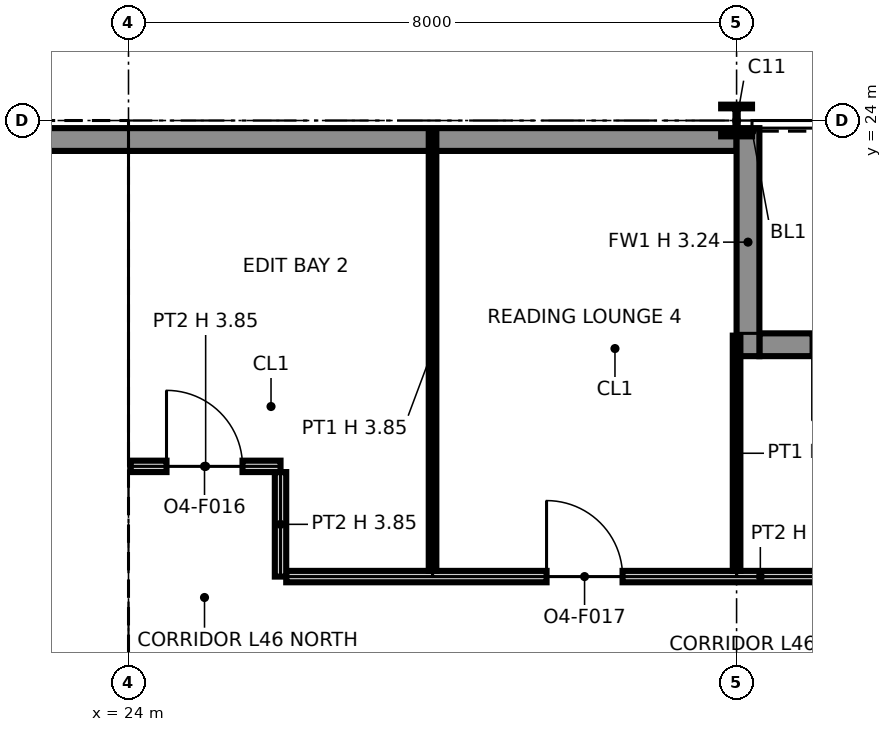
"""IFC4 building model, lengths in metres.
Left out: names, types, materials, properties, quantities, classifications, styles, units other than length and angle.
Written with IfcOpenShell. Run it as: python <this file> out.ifc"""

import sys

from ifc_helpers import new_model, si_unit, direction, frame, frame_2d, origin, origin_2d, place, context, subcontext, project, spatial, polyline, rectangle, i_section, outline, extrude, element, fill, save


model = new_model("IFC4")
c1 = context("Model", 3, precision=1e-05, world=origin(), true_north=direction((0.0, 1.0)))
c2 = subcontext(c1, "Body", "Model", "MODEL_VIEW")
j1 = project(units=[si_unit("LENGTHUNIT", "METRE"), si_unit("PLANEANGLEUNIT", "RADIAN")], contexts=[c1])
p1 = place(None, origin())
s1 = spatial("IfcSite", under=j1, at=p1, CompositionType="ELEMENT")
p2 = place(p1, origin())
s2 = spatial("IfcBuilding", under=s1, at=p2, CompositionType="ELEMENT")
p3 = place(p2, frame((0.0, 0.0, 217.0)))
s3 = spatial("IfcBuildingStorey", under=s2, at=p3, CompositionType="ELEMENT", Elevation=217.0)
for number, where, z_axis, x_axis in (
    (1, (24.0, 24.0, 0.0), (0.0, 0.0, 1.0), (1.0, 0.0, 0.0)),
    (2, (32.0, 24.0, 0.0), (0.0, 0.0, 1.0), (1.0, 0.0, 0.0)),
):
    element("IfcColumn", number, at=place(p3, frame(where, z_axis=z_axis, x_axis=x_axis)), inside=s3, PredefinedType="COLUMN", context=c2, shape_type="SweptSolid", body=[
        extrude(i_section(OverallWidth=0.406, OverallDepth=0.417, WebThickness=0.03, FlangeThickness=0.048, at=origin_2d()), origin(), (0.0, 0.0, 1.0), 3.85),
    ])
p4 = place(p3, frame((39.7, 21.05, 0.0), z_axis=(0.0, 0.0, 1.0), x_axis=(-1.0, 0.0, 0.0)))
e3 = element("IfcWall", 3, at=p4, inside=s3, PredefinedType="SOLIDWALL", context=c2, shape_type="SweptSolid", body=[
    extrude(rectangle(XDim=7.4, YDim=0.3, at=frame_2d((3.7, 0.0))), origin(), (0.0, 0.0, 1.0), 3.85),
])
p5 = place(p4, frame((0.3, 0.0, 0.9)))
e4 = element("IfcOpeningElement", 4, at=p5, cuts=e3, PredefinedType="OPENING", context=c2, shape_type="SweptSolid", body=[
    extrude(rectangle(XDim=2.8, YDim=2.2, at=frame_2d((1.4, 1.1))), frame((0.0, 0.16, 0.0), z_axis=(0.0, -1.0, 0.0), x_axis=(1.0, 0.0, 0.0)), (0.0, 0.0, 1.0), 0.32),
])
p6 = place(p4, frame((4.7, 0.0, 0.0)))
e5 = element("IfcOpeningElement", 5, at=p6, cuts=e3, PredefinedType="OPENING", context=c2, shape_type="SweptSolid", body=[
    extrude(rectangle(XDim=2.0, YDim=2.4, at=frame_2d((1.0, 1.2))), frame((0.0, 0.16, 0.0), z_axis=(0.0, -1.0, 0.0), x_axis=(1.0, 0.0, 0.0)), (0.0, 0.0, 1.0), 0.32),
])
p7 = place(p3, frame((32.15, 23.9, 0.0), z_axis=(0.0, 0.0, 1.0), x_axis=(0.0, -1.0, 0.0)))
e6 = element("IfcWall", 6, at=p7, inside=s3, PredefinedType="SOLIDWALL", context=c2, shape_type="SweptSolid", body=[
    extrude(rectangle(XDim=3.0, YDim=0.3, at=frame_2d((1.5, 0.0))), origin(), (0.0, 0.0, 1.0), 3.237),
])
p8 = place(p3, frame((32.0, 23.75, 0.0), z_axis=(0.0, 0.0, 1.0), x_axis=(-1.0, 0.0, 0.0)))
e7 = element("IfcWall", 7, at=p8, inside=s3, PredefinedType="SOLIDWALL", context=c2, shape_type="SweptSolid", body=[
    extrude(rectangle(XDim=25.9, YDim=0.3, at=frame_2d((12.95, 0.0))), origin(), (0.0, 0.0, 1.0), 3.85),
])
p9 = place(p3, frame((8.65, 23.25, 0.0), z_axis=(0.0, 0.0, 1.0), x_axis=(1.0, 0.0, 0.0)))
e8 = element("IfcWall", 8, at=p9, inside=s3, PredefinedType="PARTITIONING", context=c2, shape_type="SweptSolid", body=[
    extrude(outline(polyline([(0.0, 0.0), (14.7, 0.0), (14.7, 3.85), (7.438, 3.85), (7.438, 3.308), (7.262, 3.308), (7.261, 3.85), (0.0, 3.85), (0.0, 0.0)])), frame((0.0, 0.1, 0.0), z_axis=(0.0, -1.0, 0.0), x_axis=(1.0, 0.0, 0.0)), (0.0, 0.0, 1.0), 0.2),
])
p10 = place(p3, frame((8.85, 19.9, 0.0), z_axis=(0.0, 0.0, 1.0), x_axis=(1.0, 0.0, 0.0)))
e9 = element("IfcWall", 9, at=p10, inside=s3, PredefinedType="PARTITIONING", context=c2, shape_type="SweptSolid", body=[
    extrude(outline(polyline([(0.0, 0.0), (14.3, 0.0), (14.3, 3.85), (7.239, 3.85), (7.238, 3.308), (7.062, 3.308), (7.062, 3.85), (0.0, 3.85), (0.0, 0.0)])), frame((0.0, 0.1, 0.0), z_axis=(0.0, -1.0, 0.0), x_axis=(1.0, 0.0, 0.0)), (0.0, 0.0, 1.0), 0.2),
])
p11 = place(p10, frame((2.125, 0.0, 0.0)))
e10 = element("IfcOpeningElement", 10, at=p11, cuts=e9, PredefinedType="OPENING", context=c2, shape_type="SweptSolid", body=[
    extrude(rectangle(XDim=0.9, YDim=2.1, at=frame_2d((0.45, 1.05))), frame((0.0, 0.11, 0.0), z_axis=(0.0, -1.0, 0.0), x_axis=(1.0, 0.0, 0.0)), (0.0, 0.0, 1.0), 0.22),
])
p12 = place(p10, frame((5.65, 0.0, 0.0)))
e11 = element("IfcOpeningElement", 11, at=p12, cuts=e9, PredefinedType="OPENING", context=c2, shape_type="SweptSolid", body=[
    extrude(rectangle(XDim=1.1, YDim=2.1, at=frame_2d((0.55, 1.05))), frame((0.0, 0.11, 0.0), z_axis=(0.0, -1.0, 0.0), x_axis=(1.0, 0.0, 0.0)), (0.0, 0.0, 1.0), 0.22),
])
p13 = place(p10, frame((7.95, 0.0, 0.0)))
e12 = element("IfcOpeningElement", 12, at=p13, cuts=e9, PredefinedType="OPENING", context=c2, shape_type="SweptSolid", body=[
    extrude(rectangle(XDim=1.1, YDim=2.1, at=frame_2d((0.55, 1.05))), frame((0.0, 0.11, 0.0), z_axis=(0.0, -1.0, 0.0), x_axis=(1.0, 0.0, 0.0)), (0.0, 0.0, 1.0), 0.22),
])
p14 = place(p10, frame((10.25, 0.0, 0.0)))
e13 = element("IfcOpeningElement", 13, at=p14, cuts=e9, PredefinedType="OPENING", context=c2, shape_type="SweptSolid", body=[
    extrude(rectangle(XDim=1.1, YDim=2.1, at=frame_2d((0.55, 1.05))), frame((0.0, 0.11, 0.0), z_axis=(0.0, -1.0, 0.0), x_axis=(1.0, 0.0, 0.0)), (0.0, 0.0, 1.0), 0.22),
])
p15 = place(p10, frame((12.625, 0.0, 0.0)))
e14 = element("IfcOpeningElement", 14, at=p15, cuts=e9, PredefinedType="OPENING", context=c2, shape_type="SweptSolid", body=[
    extrude(rectangle(XDim=1.1, YDim=2.1, at=frame_2d((0.55, 1.05))), frame((0.0, 0.11, 0.0), z_axis=(0.0, -1.0, 0.0), x_axis=(1.0, 0.0, 0.0)), (0.0, 0.0, 1.0), 0.22),
])
p16 = place(p3, frame((23.25, 8.85, 0.0), z_axis=(0.0, 0.0, 1.0), x_axis=(0.0, 1.0, 0.0)))
e15 = element("IfcWall", 15, at=p16, inside=s3, PredefinedType="PARTITIONING", context=c2, shape_type="SweptSolid", body=[
    extrude(outline(polyline([(0.0, 0.0), (14.3, 0.0), (14.3, 3.85), (10.225, 3.85), (10.224, 3.44), (10.076, 3.44), (10.075, 3.85), (7.239, 3.85), (7.238, 3.308), (7.062, 3.308), (7.062, 3.85), (5.225, 3.85), (5.224, 3.44), (5.076, 3.44), (5.075, 3.85), (0.0, 3.85), (0.0, 0.0)])), frame((0.0, 0.1, 0.0), z_axis=(0.0, -1.0, 0.0), x_axis=(1.0, 0.0, 0.0)), (0.0, 0.0, 1.0), 0.2),
])
p17 = place(p16, frame((8.3, 0.0, 0.0)))
e16 = element("IfcOpeningElement", 16, at=p17, cuts=e15, PredefinedType="OPENING", context=c2, shape_type="SweptSolid", body=[
    extrude(rectangle(XDim=1.8, YDim=2.1, at=frame_2d((0.9, 1.05))), frame((0.0, 0.11, 0.0), z_axis=(0.0, -1.0, 0.0), x_axis=(1.0, 0.0, 0.0)), (0.0, 0.0, 1.0), 0.22),
])
p18 = place(p3, frame((26.075, 18.0, 0.0), z_axis=(0.0, 0.0, 1.0), x_axis=(1.0, 0.0, 0.0)))
e17 = element("IfcWall", 17, at=p18, inside=s3, PredefinedType="PARTITIONING", context=c2, shape_type="SweptSolid", body=[
    extrude(rectangle(XDim=12.475, YDim=0.15, at=frame_2d((6.238, 0.0))), origin(), (0.0, 0.0, 1.0), 3.85),
])
p19 = place(p18, frame((8.7, 0.0, 0.0)))
e18 = element("IfcOpeningElement", 18, at=p19, cuts=e17, PredefinedType="OPENING", context=c2, shape_type="SweptSolid", body=[
    extrude(rectangle(XDim=1.0, YDim=2.1, at=frame_2d((0.5, 1.05))), frame((0.0, 0.085, 0.0), z_axis=(0.0, -1.0, 0.0), x_axis=(1.0, 0.0, 0.0)), (0.0, 0.0, 1.0), 0.17),
])
p20 = place(p18, frame((3.425, 0.0, 0.0)))
e19 = element("IfcOpeningElement", 19, at=p20, cuts=e17, PredefinedType="OPENING", context=c2, shape_type="SweptSolid", body=[
    extrude(rectangle(XDim=1.0, YDim=2.1, at=frame_2d((0.5, 1.05))), frame((0.0, 0.085, 0.0), z_axis=(0.0, -1.0, 0.0), x_axis=(1.0, 0.0, 0.0)), (0.0, 0.0, 1.0), 0.17),
])
p21 = place(p3, frame((26.0, 18.0, 0.0), z_axis=(0.0, 0.0, 1.0), x_axis=(0.0, 1.0, 0.0)))
e20 = element("IfcWall", 20, at=p21, inside=s3, PredefinedType="PARTITIONING", context=c2, shape_type="SweptSolid", body=[
    extrude(rectangle(XDim=1.375, YDim=0.15, at=frame_2d((0.688, 0.0))), origin(), (0.0, 0.0, 1.0), 3.85),
])
p22 = place(p3, frame((28.0, 18.075, 0.0), z_axis=(0.0, 0.0, 1.0), x_axis=(0.0, 1.0, 0.0)))
e21 = element("IfcWall", 21, at=p22, inside=s3, PredefinedType="PARTITIONING", context=c2, shape_type="SweptSolid", body=[
    extrude(outline(polyline([(0.0, 0.0), (5.795, 0.0), (5.795, 3.85), (2.225, 3.85), (2.223, 3.172), (1.627, 3.172), (1.625, 3.85), (0.0, 3.85), (0.0, 0.0)])), frame((0.0, 0.05, 0.0), z_axis=(0.0, -1.0, 0.0), x_axis=(1.0, 0.0, 0.0)), (0.0, 0.0, 1.0), 0.1),
])
p23 = place(p3, frame((32.0, 18.075, 0.0), z_axis=(0.0, 0.0, 1.0), x_axis=(0.0, 1.0, 0.0)))
e22 = element("IfcWall", 22, at=p23, inside=s3, PredefinedType="PARTITIONING", context=c2, shape_type="SweptSolid", body=[
    extrude(rectangle(XDim=3.095, YDim=0.1, at=frame_2d((1.547, 0.0))), origin(), (0.0, 0.0, 1.0), 3.172),
])
p24 = place(p3, frame((24.03, 19.45, 0.0), z_axis=(0.0, 0.0, 1.0), x_axis=(1.0, 0.0, 0.0)))
e23 = element("IfcWall", 23, at=p24, inside=s3, PredefinedType="PARTITIONING", context=c2, shape_type="SweptSolid", body=[
    extrude(rectangle(XDim=1.97, YDim=0.15, at=frame_2d((0.985, 0.0))), origin(), (0.0, 0.0, 1.0), 3.85),
])
p25 = place(p24, frame((0.47, 0.0, 0.0)))
e24 = element("IfcOpeningElement", 24, at=p25, cuts=e23, PredefinedType="OPENING", context=c2, shape_type="SweptSolid", body=[
    extrude(rectangle(XDim=1.0, YDim=2.1, at=frame_2d((0.5, 1.05))), frame((0.0, 0.085, 0.0), z_axis=(0.0, -1.0, 0.0), x_axis=(1.0, 0.0, 0.0)), (0.0, 0.0, 1.0), 0.17),
])
p26 = place(p17, origin())
e25 = element("IfcDoor", 25, at=p26, inside=s3, OperationType="DOUBLE_DOOR_SINGLE_SWING", PredefinedType="NOTDEFINED", context=c2, shape_type="SweptSolid", body=[
    extrude(rectangle(XDim=1.8, YDim=2.1, at=frame_2d((0.9, 1.05))), frame((0.0, 0.025, 0.0), z_axis=(0.0, -1.0, 0.0), x_axis=(1.0, 0.0, 0.0)), (0.0, 0.0, 1.0), 0.05),
])
fill(e16, e25)
p27 = place(p25, origin())
e26 = element("IfcDoor", 26, at=p27, inside=s3, OperationType="SINGLE_SWING_LEFT", PredefinedType="DOOR", context=c2, shape_type="SweptSolid", body=[
    extrude(rectangle(XDim=1.0, YDim=2.1, at=frame_2d((0.5, 1.05))), frame((0.0, 0.025, 0.0), z_axis=(0.0, -1.0, 0.0), x_axis=(1.0, 0.0, 0.0)), (0.0, 0.0, 1.0), 0.05),
])
fill(e24, e26)
p28 = place(p20, origin())
e27 = element("IfcDoor", 27, at=p28, inside=s3, OperationType="SINGLE_SWING_LEFT", PredefinedType="DOOR", context=c2, shape_type="SweptSolid", body=[
    extrude(rectangle(XDim=1.0, YDim=2.1, at=frame_2d((0.5, 1.05))), frame((0.0, 0.025, 0.0), z_axis=(0.0, -1.0, 0.0), x_axis=(1.0, 0.0, 0.0)), (0.0, 0.0, 1.0), 0.05),
])
fill(e19, e27)
save(model, sys.argv[1])
